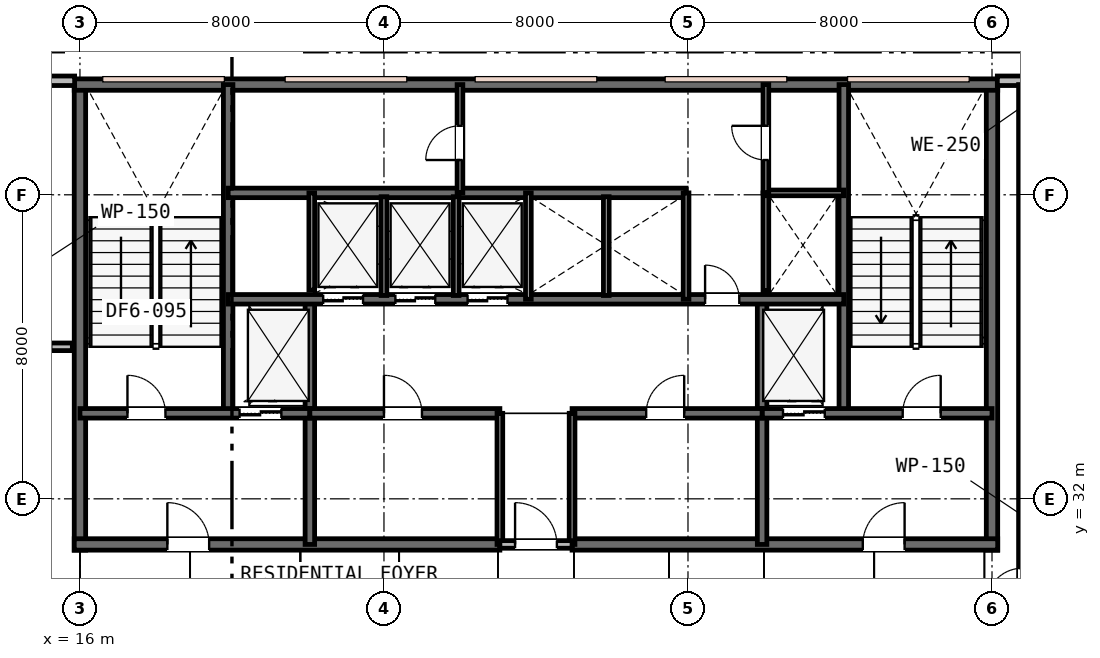
"""IFC4 building model, lengths in metres.
Left out: names, types, materials, properties, quantities, classifications, styles, units other than length and angle.
Written with IfcOpenShell. Run it as: python <this file> out.ifc"""

import sys

from ifc_helpers import new_model, si_unit, direction, frame, frame_2d, origin, place, context, subcontext, project, spatial, rectangle, extrude, element, fill, save


model = new_model("IFC4")
c1 = context("Model", 3, precision=1e-05, world=origin(), true_north=direction((0.0, 1.0)))
c2 = subcontext(c1, "Body", "Model", "MODEL_VIEW")
j1 = project(units=[si_unit("LENGTHUNIT", "METRE"), si_unit("PLANEANGLEUNIT", "RADIAN")], contexts=[c1])
p1 = place(None, origin())
s1 = spatial("IfcSite", under=j1, at=p1, CompositionType="ELEMENT")
p2 = place(p1, origin())
s2 = spatial("IfcBuilding", under=s1, at=p2, CompositionType="ELEMENT")
p3 = place(p2, frame((0.0, 0.0, 264.0)))
s3 = spatial("IfcBuildingStorey", under=s2, at=p3, CompositionType="ELEMENT", Elevation=264.0)
for number, where, z_axis, x_axis in (
    (1, (16.0, 30.65, 0.0), (0.0, 0.0, 1.0), (0.0, 1.0, 0.0)),
    (2, (40.0, 30.65, 0.0), (0.0, 0.0, 1.0), (0.0, 1.0, 0.0)),
):
    element("IfcWall", number, at=place(p3, frame(where, z_axis=z_axis, x_axis=x_axis)), inside=s3, PredefinedType="SHEAR", context=c2, shape_type="SweptSolid", body=[
        extrude(rectangle(XDim=12.3, YDim=0.3, at=frame_2d((6.15, 0.0))), origin(), (0.0, 0.0, 1.0), 3.8),
    ])
p4 = place(p3, frame((15.85, 42.9, 0.0), z_axis=(0.0, 0.0, 1.0), x_axis=(1.0, 0.0, 0.0)))
e3 = element("IfcWall", 3, at=p4, inside=s3, PredefinedType="SHEAR", context=c2, shape_type="SweptSolid", body=[
    extrude(rectangle(XDim=24.3, YDim=0.3, at=frame_2d((12.15, 0.0))), origin(), (0.0, 0.0, 1.0), 3.8),
])
p5 = place(p3, frame((15.85, 30.8, 0.0), z_axis=(0.0, 0.0, 1.0), x_axis=(1.0, 0.0, 0.0)))
e4 = element("IfcWall", 4, at=p5, inside=s3, PredefinedType="SHEAR", context=c2, shape_type="SweptSolid", body=[
    extrude(rectangle(XDim=11.2, YDim=0.3, at=frame_2d((5.6, 0.0))), origin(), (0.0, 0.0, 1.0), 3.8),
])
p6 = place(p5, frame((2.45, 0.0, 0.0)))
e5 = element("IfcOpeningElement", 5, at=p6, cuts=e4, PredefinedType="OPENING", context=c2, shape_type="SweptSolid", body=[
    extrude(rectangle(XDim=1.1, YDim=2.15, at=frame_2d((0.55, 1.075))), frame((0.0, 0.16, 0.0), z_axis=(0.0, -1.0, 0.0), x_axis=(1.0, 0.0, 0.0)), (0.0, 0.0, 1.0), 0.32),
])
p7 = place(p3, frame((28.95, 30.8, 0.0), z_axis=(0.0, 0.0, 1.0), x_axis=(1.0, 0.0, 0.0)))
e6 = element("IfcWall", 6, at=p7, inside=s3, PredefinedType="SHEAR", context=c2, shape_type="SweptSolid", body=[
    extrude(rectangle(XDim=11.2, YDim=0.3, at=frame_2d((5.6, 0.0))), origin(), (0.0, 0.0, 1.0), 3.8),
])
p8 = place(p7, frame((7.65, 0.0, 0.0)))
e7 = element("IfcOpeningElement", 7, at=p8, cuts=e6, PredefinedType="OPENING", context=c2, shape_type="SweptSolid", body=[
    extrude(rectangle(XDim=1.1, YDim=2.15, at=frame_2d((0.55, 1.075))), frame((0.0, 0.16, 0.0), z_axis=(0.0, -1.0, 0.0), x_axis=(1.0, 0.0, 0.0)), (0.0, 0.0, 1.0), 0.32),
])
for number, where, z_axis, x_axis in (
    (8, (19.9, 34.25, 0.0), (0.0, 0.0, 1.0), (0.0, 1.0, 0.0)),
    (9, (36.1, 34.25, 0.0), (0.0, 0.0, 1.0), (0.0, 1.0, 0.0)),
):
    element("IfcWall", number, at=place(p3, frame(where, z_axis=z_axis, x_axis=x_axis)), inside=s3, PredefinedType="SHEAR", context=c2, shape_type="SweptSolid", body=[
        extrude(rectangle(XDim=8.65, YDim=0.25, at=frame_2d((4.325, 0.0))), origin(), (0.0, 0.0, 1.0), 3.8),
    ])
for number, where, z_axis, x_axis in (
    (10, (22.05, 30.8, 0.0), (0.0, 0.0, 1.0), (0.0, 1.0, 0.0)),
    (11, (33.95, 30.8, 0.0), (0.0, 0.0, 1.0), (0.0, 1.0, 0.0)),
):
    element("IfcWall", number, at=place(p3, frame(where, z_axis=z_axis, x_axis=x_axis)), inside=s3, PredefinedType="SHEAR", context=c2, shape_type="SweptSolid", body=[
        extrude(rectangle(XDim=6.45, YDim=0.25, at=frame_2d((3.225, 0.0))), origin(), (0.0, 0.0, 1.0), 3.8),
    ])
p9 = place(p3, frame((16.0, 34.25, 0.0), z_axis=(0.0, 0.0, 1.0), x_axis=(1.0, 0.0, 0.0)))
e12 = element("IfcWall", 12, at=p9, inside=s3, PredefinedType="SHEAR", context=c2, shape_type="SweptSolid", body=[
    extrude(rectangle(XDim=6.05, YDim=0.25, at=frame_2d((3.025, 0.0))), origin(), (0.0, 0.0, 1.0), 3.8),
])
p10 = place(p9, frame((1.25, 0.0, 0.0)))
e13 = element("IfcOpeningElement", 13, at=p10, cuts=e12, PredefinedType="OPENING", context=c2, shape_type="SweptSolid", body=[
    extrude(rectangle(XDim=1.0, YDim=2.15, at=frame_2d((0.5, 1.075))), frame((0.0, 0.135, 0.0), z_axis=(0.0, -1.0, 0.0), x_axis=(1.0, 0.0, 0.0)), (0.0, 0.0, 1.0), 0.27),
])
p11 = place(p9, frame((4.2, 0.0, 0.0)))
e14 = element("IfcOpeningElement", 14, at=p11, cuts=e12, PredefinedType="OPENING", context=c2, shape_type="SweptSolid", body=[
    extrude(rectangle(XDim=1.1, YDim=2.15, at=frame_2d((0.55, 1.075))), frame((0.0, 0.135, 0.0), z_axis=(0.0, -1.0, 0.0), x_axis=(1.0, 0.0, 0.0)), (0.0, 0.0, 1.0), 0.27),
])
p12 = place(p3, frame((33.95, 34.25, 0.0), z_axis=(0.0, 0.0, 1.0), x_axis=(1.0, 0.0, 0.0)))
e15 = element("IfcWall", 15, at=p12, inside=s3, PredefinedType="SHEAR", context=c2, shape_type="SweptSolid", body=[
    extrude(rectangle(XDim=6.05, YDim=0.25, at=frame_2d((3.025, 0.0))), origin(), (0.0, 0.0, 1.0), 3.8),
])
p13 = place(p12, frame((3.7, 0.0, 0.0)))
e16 = element("IfcOpeningElement", 16, at=p13, cuts=e15, PredefinedType="OPENING", context=c2, shape_type="SweptSolid", body=[
    extrude(rectangle(XDim=1.0, YDim=2.15, at=frame_2d((0.5, 1.075))), frame((0.0, 0.135, 0.0), z_axis=(0.0, -1.0, 0.0), x_axis=(1.0, 0.0, 0.0)), (0.0, 0.0, 1.0), 0.27),
])
p14 = place(p12, frame((0.55, 0.0, 0.0)))
e17 = element("IfcOpeningElement", 17, at=p14, cuts=e15, PredefinedType="OPENING", context=c2, shape_type="SweptSolid", body=[
    extrude(rectangle(XDim=1.1, YDim=2.15, at=frame_2d((0.55, 1.075))), frame((0.0, 0.135, 0.0), z_axis=(0.0, -1.0, 0.0), x_axis=(1.0, 0.0, 0.0)), (0.0, 0.0, 1.0), 0.27),
])
p15 = place(p3, frame((22.05, 34.25, 0.0), z_axis=(0.0, 0.0, 1.0), x_axis=(1.0, 0.0, 0.0)))
e18 = element("IfcWall", 18, at=p15, inside=s3, PredefinedType="SHEAR", context=c2, shape_type="SweptSolid", body=[
    extrude(rectangle(XDim=5.0, YDim=0.25, at=frame_2d((2.5, 0.0))), origin(), (0.0, 0.0, 1.0), 3.8),
])
p16 = place(p15, frame((1.95, 0.0, 0.0)))
e19 = element("IfcOpeningElement", 19, at=p16, cuts=e18, PredefinedType="OPENING", context=c2, shape_type="SweptSolid", body=[
    extrude(rectangle(XDim=1.0, YDim=2.15, at=frame_2d((0.5, 1.075))), frame((0.0, 0.135, 0.0), z_axis=(0.0, -1.0, 0.0), x_axis=(1.0, 0.0, 0.0)), (0.0, 0.0, 1.0), 0.27),
])
p17 = place(p3, frame((28.95, 34.25, 0.0), z_axis=(0.0, 0.0, 1.0), x_axis=(1.0, 0.0, 0.0)))
e20 = element("IfcWall", 20, at=p17, inside=s3, PredefinedType="SHEAR", context=c2, shape_type="SweptSolid", body=[
    extrude(rectangle(XDim=5.0, YDim=0.25, at=frame_2d((2.5, 0.0))), origin(), (0.0, 0.0, 1.0), 3.8),
])
p18 = place(p17, frame((1.95, 0.0, 0.0)))
e21 = element("IfcOpeningElement", 21, at=p18, cuts=e20, PredefinedType="OPENING", context=c2, shape_type="SweptSolid", body=[
    extrude(rectangle(XDim=1.0, YDim=2.15, at=frame_2d((0.5, 1.075))), frame((0.0, 0.135, 0.0), z_axis=(0.0, -1.0, 0.0), x_axis=(1.0, 0.0, 0.0)), (0.0, 0.0, 1.0), 0.27),
])
p19 = place(p3, frame((19.9, 37.25, 0.0), z_axis=(0.0, 0.0, 1.0), x_axis=(1.0, 0.0, 0.0)))
e22 = element("IfcWall", 22, at=p19, inside=s3, PredefinedType="SHEAR", context=c2, shape_type="SweptSolid", body=[
    extrude(rectangle(XDim=16.2, YDim=0.25, at=frame_2d((8.1, 0.0))), origin(), (0.0, 0.0, 1.0), 3.8),
])
p20 = place(p19, frame((12.55, 0.0, 0.0)))
e23 = element("IfcOpeningElement", 23, at=p20, cuts=e22, PredefinedType="OPENING", context=c2, shape_type="SweptSolid", body=[
    extrude(rectangle(XDim=0.9, YDim=2.15, at=frame_2d((0.45, 1.075))), frame((0.0, 0.135, 0.0), z_axis=(0.0, -1.0, 0.0), x_axis=(1.0, 0.0, 0.0)), (0.0, 0.0, 1.0), 0.27),
])
p21 = place(p19, frame((2.5, 0.0, 0.0)))
e24 = element("IfcOpeningElement", 24, at=p21, cuts=e22, PredefinedType="OPENING", context=c2, shape_type="SweptSolid", body=[
    extrude(rectangle(XDim=1.05, YDim=2.15, at=frame_2d((0.525, 1.075))), frame((0.0, 0.135, 0.0), z_axis=(0.0, -1.0, 0.0), x_axis=(1.0, 0.0, 0.0)), (0.0, 0.0, 1.0), 0.27),
])
p22 = place(p19, frame((4.4, 0.0, 0.0)))
e25 = element("IfcOpeningElement", 25, at=p22, cuts=e22, PredefinedType="OPENING", context=c2, shape_type="SweptSolid", body=[
    extrude(rectangle(XDim=1.05, YDim=2.15, at=frame_2d((0.525, 1.075))), frame((0.0, 0.135, 0.0), z_axis=(0.0, -1.0, 0.0), x_axis=(1.0, 0.0, 0.0)), (0.0, 0.0, 1.0), 0.27),
])
p23 = place(p19, frame((6.3, 0.0, 0.0)))
e26 = element("IfcOpeningElement", 26, at=p23, cuts=e22, PredefinedType="OPENING", context=c2, shape_type="SweptSolid", body=[
    extrude(rectangle(XDim=1.05, YDim=2.15, at=frame_2d((0.525, 1.075))), frame((0.0, 0.135, 0.0), z_axis=(0.0, -1.0, 0.0), x_axis=(1.0, 0.0, 0.0)), (0.0, 0.0, 1.0), 0.27),
])
p24 = place(p3, frame((19.9, 40.05, 0.0), z_axis=(0.0, 0.0, 1.0), x_axis=(1.0, 0.0, 0.0)))
e27 = element("IfcWall", 27, at=p24, inside=s3, PredefinedType="SHEAR", context=c2, shape_type="SweptSolid", body=[
    extrude(rectangle(XDim=12.05, YDim=0.25, at=frame_2d((6.025, 0.0))), origin(), (0.0, 0.0, 1.0), 3.8),
])
p25 = place(p3, frame((43.4, 43.0, 0.0), z_axis=(0.0, 0.0, 1.0), x_axis=(-1.0, 0.0, 0.0)))
e28 = element("IfcWall", 28, at=p25, inside=s3, PredefinedType="STANDARD", context=c2, shape_type="SweptSolid", body=[
    extrude(rectangle(XDim=3.26, YDim=0.25, at=frame_2d((1.63, 0.0))), origin(), (0.0, 0.0, 1.0), 3.53),
])
p26 = place(p25, frame((0.86, 0.0, 0.85)))
e29 = element("IfcOpeningElement", 29, at=p26, cuts=e28, PredefinedType="OPENING", context=c2, shape_type="SweptSolid", body=[
    extrude(rectangle(XDim=1.2, YDim=1.6, at=frame_2d((0.6, 0.8))), frame((0.0, 0.135, 0.0), z_axis=(0.0, -1.0, 0.0), x_axis=(1.0, 0.0, 0.0)), (0.0, 0.0, 1.0), 0.27),
])
p27 = place(p3, frame((15.86, 43.0, 0.0), z_axis=(0.0, 0.0, 1.0), x_axis=(-1.0, 0.0, 0.0)))
e30 = element("IfcWall", 30, at=p27, inside=s3, PredefinedType="STANDARD", context=c2, shape_type="SweptSolid", body=[
    extrude(rectangle(XDim=4.06, YDim=0.25, at=frame_2d((2.03, 0.0))), origin(), (0.0, 0.0, 1.0), 3.53),
])
p28 = place(p27, frame((0.84, 0.0, 0.75)))
e31 = element("IfcOpeningElement", 31, at=p28, cuts=e30, PredefinedType="OPENING", context=c2, shape_type="SweptSolid", body=[
    extrude(rectangle(XDim=1.8, YDim=1.85, at=frame_2d((0.9, 0.925))), frame((0.0, 0.135, 0.0), z_axis=(0.0, -1.0, 0.0), x_axis=(1.0, 0.0, 0.0)), (0.0, 0.0, 1.0), 0.27),
])
for number, where, z_axis, x_axis in (
    (32, (27.05, 30.8, 0.0), (0.0, 0.0, 1.0), (0.0, 1.0, 0.0)),
    (33, (28.95, 30.8, 0.0), (0.0, 0.0, 1.0), (0.0, 1.0, 0.0)),
):
    element("IfcWall", number, at=place(p3, frame(where, z_axis=z_axis, x_axis=x_axis)), inside=s3, PredefinedType="PLUMBINGWALL", context=c2, shape_type="SweptSolid", body=[
        extrude(rectangle(XDim=3.45, YDim=0.15, at=frame_2d((1.725, 0.0))), origin(), (0.0, 0.0, 1.0), 3.28),
    ])
p29 = place(p3, frame((27.05, 30.8, 0.0), z_axis=(0.0, 0.0, 1.0), x_axis=(1.0, 0.0, 0.0)))
e34 = element("IfcWall", 34, at=p29, inside=s3, PredefinedType="PARTITIONING", context=c2, shape_type="SweptSolid", body=[
    extrude(rectangle(XDim=1.9, YDim=0.2, at=frame_2d((0.95, 0.0))), origin(), (0.0, 0.0, 1.0), 3.28),
])
p30 = place(p29, frame((0.4, 0.0, 0.0)))
e35 = element("IfcOpeningElement", 35, at=p30, cuts=e34, PredefinedType="OPENING", context=c2, shape_type="SweptSolid", body=[
    extrude(rectangle(XDim=1.1, YDim=2.15, at=frame_2d((0.55, 1.075))), frame((0.0, 0.11, 0.0), z_axis=(0.0, -1.0, 0.0), x_axis=(1.0, 0.0, 0.0)), (0.0, 0.0, 1.0), 0.22),
])
p31 = place(p3, frame((22.1, 37.49, 0.0), z_axis=(0.0, 0.0, 1.0), x_axis=(0.0, 1.0, 0.0)))
e36 = element("IfcWall", 36, at=p31, inside=s3, PredefinedType="PLUMBINGWALL", context=c2, shape_type="SweptSolid", body=[
    extrude(rectangle(XDim=2.56, YDim=0.15, at=frame_2d((1.28, 0.0))), origin(), (0.0, 0.0, 1.0), 3.53),
])
p32 = place(p3, frame((27.8, 37.25, 0.0), z_axis=(0.0, 0.0, 1.0), x_axis=(0.0, 1.0, 0.0)))
e37 = element("IfcWall", 37, at=p32, inside=s3, PredefinedType="PLUMBINGWALL", context=c2, shape_type="SweptSolid", body=[
    extrude(rectangle(XDim=2.8, YDim=0.15, at=frame_2d((1.4, 0.0))), origin(), (0.0, 0.0, 1.0), 3.53),
])
for number, where, z_axis, x_axis in (
    (38, (24.0, 37.35, 0.0), (0.0, 0.0, 1.0), (0.0, 1.0, 0.0)),
    (39, (25.9, 37.35, 0.0), (0.0, 0.0, 1.0), (0.0, 1.0, 0.0)),
):
    element("IfcWall", number, at=place(p3, frame(where, z_axis=z_axis, x_axis=x_axis)), inside=s3, PredefinedType="PLUMBINGWALL", context=c2, shape_type="SweptSolid", body=[
        extrude(rectangle(XDim=2.6, YDim=0.15, at=frame_2d((1.3, 0.0))), origin(), (0.0, 0.0, 1.0), 3.53),
    ])
p33 = place(p3, frame((31.95, 37.25, 0.0), z_axis=(0.0, 0.0, 1.0), x_axis=(0.0, 1.0, 0.0)))
e40 = element("IfcWall", 40, at=p33, inside=s3, PredefinedType="PLUMBINGWALL", context=c2, shape_type="SweptSolid", body=[
    extrude(rectangle(XDim=2.8, YDim=0.15, at=frame_2d((1.4, 0.0))), origin(), (0.0, 0.0, 1.0), 3.53),
])
p34 = place(p3, frame((29.85, 37.35, 0.0), z_axis=(0.0, 0.0, 1.0), x_axis=(0.0, 1.0, 0.0)))
e41 = element("IfcWall", 41, at=p34, inside=s3, PredefinedType="PLUMBINGWALL", context=c2, shape_type="SweptSolid", body=[
    extrude(rectangle(XDim=2.6, YDim=0.15, at=frame_2d((1.3, 0.0))), origin(), (0.0, 0.0, 1.0), 3.53),
])
p35 = place(p3, frame((34.05, 37.473, 0.0), z_axis=(0.0, 0.0, 1.0), x_axis=(0.0, 1.0, 0.0)))
e42 = element("IfcWall", 42, at=p35, inside=s3, PredefinedType="PLUMBINGWALL", context=c2, shape_type="SweptSolid", body=[
    extrude(rectangle(XDim=2.577, YDim=0.15, at=frame_2d((1.288, 0.0))), origin(), (0.0, 0.0, 1.0), 3.53),
])
p36 = place(p3, frame((34.05, 40.05, 0.0), z_axis=(0.0, 0.0, 1.0), x_axis=(1.0, 0.0, 0.0)))
e43 = element("IfcWall", 43, at=p36, inside=s3, PredefinedType="PARTITIONING", context=c2, shape_type="SweptSolid", body=[
    extrude(rectangle(XDim=2.05, YDim=0.15, at=frame_2d((1.025, 0.0))), origin(), (0.0, 0.0, 1.0), 3.53),
])
p37 = place(p3, frame((34.05, 40.05, 0.0), z_axis=(0.0, 0.0, 1.0), x_axis=(0.0, 1.0, 0.0)))
e44 = element("IfcWall", 44, at=p37, inside=s3, PredefinedType="PARTITIONING", context=c2, shape_type="SweptSolid", body=[
    extrude(rectangle(XDim=2.85, YDim=0.15, at=frame_2d((1.425, 0.0))), origin(), (0.0, 0.0, 1.0), 3.53),
])
p38 = place(p37, frame((0.865, 0.0, 0.0)))
e45 = element("IfcOpeningElement", 45, at=p38, cuts=e44, PredefinedType="OPENING", context=c2, shape_type="SweptSolid", body=[
    extrude(rectangle(XDim=0.9, YDim=2.15, at=frame_2d((0.45, 1.075))), frame((0.0, 0.085, 0.0), z_axis=(0.0, -1.0, 0.0), x_axis=(1.0, 0.0, 0.0)), (0.0, 0.0, 1.0), 0.17),
])
p39 = place(p3, frame((26.0, 40.05, 0.0), z_axis=(0.0, 0.0, 1.0), x_axis=(0.0, 1.0, 0.0)))
e46 = element("IfcWall", 46, at=p39, inside=s3, PredefinedType="PARTITIONING", context=c2, shape_type="SweptSolid", body=[
    extrude(rectangle(XDim=2.85, YDim=0.15, at=frame_2d((1.425, 0.0))), origin(), (0.0, 0.0, 1.0), 3.53),
])
p40 = place(p39, frame((0.865, 0.0, 0.0)))
e47 = element("IfcOpeningElement", 47, at=p40, cuts=e46, PredefinedType="OPENING", context=c2, shape_type="SweptSolid", body=[
    extrude(rectangle(XDim=0.9, YDim=2.15, at=frame_2d((0.45, 1.075))), frame((0.0, 0.085, 0.0), z_axis=(0.0, -1.0, 0.0), x_axis=(1.0, 0.0, 0.0)), (0.0, 0.0, 1.0), 0.17),
])
p41 = place(p3, frame((9.3, 36.0, 0.0), z_axis=(0.0, 0.0, 1.0), x_axis=(1.0, 0.0, 0.0)))
e48 = element("IfcWall", 48, at=p41, inside=s3, PredefinedType="PARTITIONING", context=c2, shape_type="SweptSolid", body=[
    extrude(rectangle(XDim=6.5, YDim=0.2, at=frame_2d((3.25, 0.0))), origin(), (0.0, 0.0, 1.0), 3.53),
])
p42 = place(p41, frame((4.995, 0.0, 0.0)))
e49 = element("IfcOpeningElement", 49, at=p42, cuts=e48, PredefinedType="OPENING", context=c2, shape_type="SweptSolid", body=[
    extrude(rectangle(XDim=0.95, YDim=2.15, at=frame_2d((0.475, 1.075))), frame((0.0, 0.11, 0.0), z_axis=(0.0, -1.0, 0.0), x_axis=(1.0, 0.0, 0.0)), (0.0, 0.0, 1.0), 0.22),
])
p43 = place(p3, frame((40.8, 28.6, 0.0), z_axis=(0.0, 0.0, 1.0), x_axis=(0.0, 1.0, 0.0)))
e50 = element("IfcWall", 50, at=p43, inside=s3, PredefinedType="PARTITIONING", context=c2, shape_type="SweptSolid", body=[
    extrude(rectangle(XDim=14.3, YDim=0.2, at=frame_2d((7.15, 0.0))), origin(), (0.0, 0.0, 1.0), 3.16),
])
p44 = place(p43, frame((0.625, 0.0, 0.0)))
e51 = element("IfcOpeningElement", 51, at=p44, cuts=e50, PredefinedType="OPENING", context=c2, shape_type="SweptSolid", body=[
    extrude(rectangle(XDim=0.95, YDim=2.15, at=frame_2d((0.475, 1.075))), frame((0.0, 0.11, 0.0), z_axis=(0.0, -1.0, 0.0), x_axis=(1.0, 0.0, 0.0)), (0.0, 0.0, 1.0), 0.22),
])
p45 = place(p30, origin())
e52 = element("IfcDoor", 52, at=p45, inside=s3, OperationType="SINGLE_SWING_LEFT", PredefinedType="DOOR", context=c2, shape_type="SweptSolid", body=[
    extrude(rectangle(XDim=1.1, YDim=2.15, at=frame_2d((0.55, 1.075))), frame((0.0, 0.025, 0.0), z_axis=(0.0, -1.0, 0.0), x_axis=(1.0, 0.0, 0.0)), (0.0, 0.0, 1.0), 0.05),
])
fill(e35, e52)
p46 = place(p10, origin())
e53 = element("IfcDoor", 53, at=p46, inside=s3, OperationType="SINGLE_SWING_LEFT", PredefinedType="DOOR", context=c2, shape_type="SweptSolid", body=[
    extrude(rectangle(XDim=1.0, YDim=2.15, at=frame_2d((0.5, 1.075))), frame((0.0, 0.025, 0.0), z_axis=(0.0, -1.0, 0.0), x_axis=(1.0, 0.0, 0.0)), (0.0, 0.0, 1.0), 0.05),
])
fill(e13, e53)
p47 = place(p13, origin())
e54 = element("IfcDoor", 54, at=p47, inside=s3, OperationType="SINGLE_SWING_RIGHT", PredefinedType="DOOR", context=c2, shape_type="SweptSolid", body=[
    extrude(rectangle(XDim=1.0, YDim=2.15, at=frame_2d((0.5, 1.075))), frame((0.0, 0.025, 0.0), z_axis=(0.0, -1.0, 0.0), x_axis=(1.0, 0.0, 0.0)), (0.0, 0.0, 1.0), 0.05),
])
fill(e16, e54)
p48 = place(p6, origin())
e55 = element("IfcDoor", 55, at=p48, inside=s3, OperationType="SINGLE_SWING_LEFT", PredefinedType="DOOR", context=c2, shape_type="SweptSolid", body=[
    extrude(rectangle(XDim=1.1, YDim=2.15, at=frame_2d((0.55, 1.075))), frame((0.0, 0.025, 0.0), z_axis=(0.0, -1.0, 0.0), x_axis=(1.0, 0.0, 0.0)), (0.0, 0.0, 1.0), 0.05),
])
fill(e5, e55)
p49 = place(p8, origin())
e56 = element("IfcDoor", 56, at=p49, inside=s3, OperationType="SINGLE_SWING_RIGHT", PredefinedType="DOOR", context=c2, shape_type="SweptSolid", body=[
    extrude(rectangle(XDim=1.1, YDim=2.15, at=frame_2d((0.55, 1.075))), frame((0.0, 0.025, 0.0), z_axis=(0.0, -1.0, 0.0), x_axis=(1.0, 0.0, 0.0)), (0.0, 0.0, 1.0), 0.05),
])
fill(e7, e56)
p50 = place(p16, origin())
e57 = element("IfcDoor", 57, at=p50, inside=s3, OperationType="SINGLE_SWING_LEFT", PredefinedType="DOOR", context=c2, shape_type="SweptSolid", body=[
    extrude(rectangle(XDim=1.0, YDim=2.15, at=frame_2d((0.5, 1.075))), frame((0.0, 0.025, 0.0), z_axis=(0.0, -1.0, 0.0), x_axis=(1.0, 0.0, 0.0)), (0.0, 0.0, 1.0), 0.05),
])
fill(e19, e57)
p51 = place(p18, origin())
e58 = element("IfcDoor", 58, at=p51, inside=s3, OperationType="SINGLE_SWING_RIGHT", PredefinedType="DOOR", context=c2, shape_type="SweptSolid", body=[
    extrude(rectangle(XDim=1.0, YDim=2.15, at=frame_2d((0.5, 1.075))), frame((0.0, 0.025, 0.0), z_axis=(0.0, -1.0, 0.0), x_axis=(1.0, 0.0, 0.0)), (0.0, 0.0, 1.0), 0.05),
])
fill(e21, e58)
p52 = place(p20, origin())
e59 = element("IfcDoor", 59, at=p52, inside=s3, OperationType="SINGLE_SWING_LEFT", PredefinedType="DOOR", context=c2, shape_type="SweptSolid", body=[
    extrude(rectangle(XDim=0.9, YDim=2.15, at=frame_2d((0.45, 1.075))), frame((0.0, 0.025, 0.0), z_axis=(0.0, -1.0, 0.0), x_axis=(1.0, 0.0, 0.0)), (0.0, 0.0, 1.0), 0.05),
])
fill(e23, e59)
p53 = place(p38, origin())
e60 = element("IfcDoor", 60, at=p53, inside=s3, OperationType="SINGLE_SWING_RIGHT", PredefinedType="DOOR", context=c2, shape_type="SweptSolid", body=[
    extrude(rectangle(XDim=0.9, YDim=2.15, at=frame_2d((0.45, 1.075))), frame((0.0, 0.025, 0.0), z_axis=(0.0, -1.0, 0.0), x_axis=(1.0, 0.0, 0.0)), (0.0, 0.0, 1.0), 0.05),
])
fill(e45, e60)
p54 = place(p40, origin())
e61 = element("IfcDoor", 61, at=p54, inside=s3, OperationType="SINGLE_SWING_LEFT", PredefinedType="DOOR", context=c2, shape_type="SweptSolid", body=[
    extrude(rectangle(XDim=0.9, YDim=2.15, at=frame_2d((0.45, 1.075))), frame((0.0, 0.025, 0.0), z_axis=(0.0, -1.0, 0.0), x_axis=(1.0, 0.0, 0.0)), (0.0, 0.0, 1.0), 0.05),
])
fill(e47, e61)
p55 = place(p11, origin())
e62 = element("IfcDoor", 62, at=p55, inside=s3, OperationType="DOUBLE_DOOR_SLIDING", PredefinedType="DOOR", context=c2, shape_type="SweptSolid", body=[
    extrude(rectangle(XDim=1.1, YDim=2.15, at=frame_2d((0.55, 1.075))), frame((0.0, 0.025, 0.0), z_axis=(0.0, -1.0, 0.0), x_axis=(1.0, 0.0, 0.0)), (0.0, 0.0, 1.0), 0.05),
])
fill(e14, e62)
p56 = place(p14, origin())
e63 = element("IfcDoor", 63, at=p56, inside=s3, OperationType="DOUBLE_DOOR_SLIDING", PredefinedType="DOOR", context=c2, shape_type="SweptSolid", body=[
    extrude(rectangle(XDim=1.1, YDim=2.15, at=frame_2d((0.55, 1.075))), frame((0.0, 0.025, 0.0), z_axis=(0.0, -1.0, 0.0), x_axis=(1.0, 0.0, 0.0)), (0.0, 0.0, 1.0), 0.05),
])
fill(e17, e63)
p57 = place(p21, origin())
e64 = element("IfcDoor", 64, at=p57, inside=s3, OperationType="DOUBLE_DOOR_SLIDING", PredefinedType="DOOR", context=c2, shape_type="SweptSolid", body=[
    extrude(rectangle(XDim=1.05, YDim=2.15, at=frame_2d((0.525, 1.075))), frame((0.0, 0.025, 0.0), z_axis=(0.0, -1.0, 0.0), x_axis=(1.0, 0.0, 0.0)), (0.0, 0.0, 1.0), 0.05),
])
fill(e24, e64)
p58 = place(p22, origin())
e65 = element("IfcDoor", 65, at=p58, inside=s3, OperationType="DOUBLE_DOOR_SLIDING", PredefinedType="DOOR", context=c2, shape_type="SweptSolid", body=[
    extrude(rectangle(XDim=1.05, YDim=2.15, at=frame_2d((0.525, 1.075))), frame((0.0, 0.025, 0.0), z_axis=(0.0, -1.0, 0.0), x_axis=(1.0, 0.0, 0.0)), (0.0, 0.0, 1.0), 0.05),
])
fill(e25, e65)
p59 = place(p23, origin())
e66 = element("IfcDoor", 66, at=p59, inside=s3, OperationType="DOUBLE_DOOR_SLIDING", PredefinedType="DOOR", context=c2, shape_type="SweptSolid", body=[
    extrude(rectangle(XDim=1.05, YDim=2.15, at=frame_2d((0.525, 1.075))), frame((0.0, 0.025, 0.0), z_axis=(0.0, -1.0, 0.0), x_axis=(1.0, 0.0, 0.0)), (0.0, 0.0, 1.0), 0.05),
])
fill(e26, e66)
save(model, sys.argv[1])
